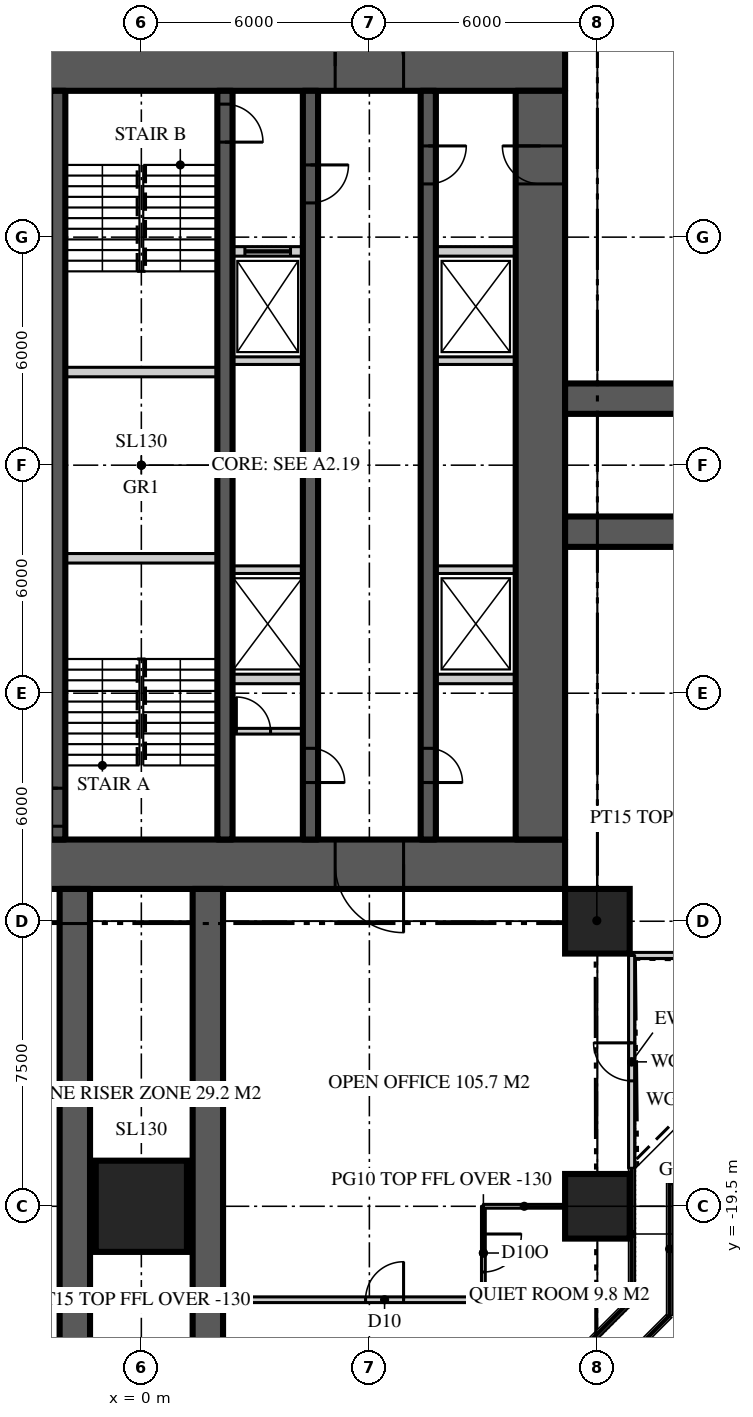
"""IFC4 building model, lengths in metres.
Left out: names, types, materials, properties, quantities, classifications, styles, units other than length and angle.
Written with IfcOpenShell. Run it as: python <this file> out.ifc"""

import sys

from ifc_helpers import new_model, si_unit, direction, frame, frame_2d, origin, origin_2d, place, context, subcontext, project, spatial, rectangle, extrude, element, fill, save


model = new_model("IFC4")
c1 = context("Model", 3, precision=1e-05, world=origin(), true_north=direction((0.0, 1.0)))
c2 = subcontext(c1, "Body", "Model", "MODEL_VIEW")
j1 = project(units=[si_unit("LENGTHUNIT", "METRE"), si_unit("PLANEANGLEUNIT", "RADIAN")], contexts=[c1])
p1 = place(None, origin())
s1 = spatial("IfcSite", under=j1, at=p1, CompositionType="ELEMENT")
p2 = place(p1, origin())
s2 = spatial("IfcBuilding", under=s1, at=p2, CompositionType="ELEMENT")
p3 = place(p2, frame((0.0, 0.0, 132.0)))
s3 = spatial("IfcBuildingStorey", under=s2, at=p3, CompositionType="ELEMENT", Elevation=132.0)
p4 = place(p3, frame((-11.15, 10.5, 0.0), z_axis=(0.0, 0.0, 1.0), x_axis=(1.0, 0.0, 0.0)))
e1 = element("IfcWall", 1, at=p4, inside=s3, PredefinedType="SHEAR", context=c2, shape_type="SweptSolid", body=[
    extrude(rectangle(XDim=22.3, YDim=1.3, at=frame_2d((11.15, 0.0))), origin(), (0.0, 0.0, 1.0), 3.9),
])
p5 = place(p4, frame((4.25, 0.0, 0.0)))
e2 = element("IfcOpeningElement", 2, at=p5, cuts=e1, PredefinedType="OPENING", context=c2, shape_type="SweptSolid", body=[
    extrude(rectangle(XDim=1.8, YDim=2.2, at=frame_2d((0.9, 1.1))), frame((0.0, 0.66, 0.0), z_axis=(0.0, -1.0, 0.0), x_axis=(1.0, 0.0, 0.0)), (0.0, 0.0, 1.0), 1.32),
])
p6 = place(p4, frame((16.25, 0.0, 0.0)))
e3 = element("IfcOpeningElement", 3, at=p6, cuts=e1, PredefinedType="OPENING", context=c2, shape_type="SweptSolid", body=[
    extrude(rectangle(XDim=1.8, YDim=2.2, at=frame_2d((0.9, 1.1))), frame((0.0, 0.66, 0.0), z_axis=(0.0, -1.0, 0.0), x_axis=(1.0, 0.0, 0.0)), (0.0, 0.0, 1.0), 1.32),
])
p7 = place(p3, frame((11.15, -10.5, 0.0), z_axis=(0.0, 0.0, 1.0), x_axis=(-1.0, 0.0, 0.0)))
e4 = element("IfcWall", 4, at=p7, inside=s3, PredefinedType="SHEAR", context=c2, shape_type="SweptSolid", body=[
    extrude(rectangle(XDim=22.3, YDim=1.3, at=frame_2d((11.15, 0.0))), origin(), (0.0, 0.0, 1.0), 3.9),
])
p8 = place(p7, frame((16.25, 0.0, 0.0)))
e5 = element("IfcOpeningElement", 5, at=p8, cuts=e4, PredefinedType="OPENING", context=c2, shape_type="SweptSolid", body=[
    extrude(rectangle(XDim=1.8, YDim=2.2, at=frame_2d((0.9, 1.1))), frame((0.0, 0.66, 0.0), z_axis=(0.0, -1.0, 0.0), x_axis=(1.0, 0.0, 0.0)), (0.0, 0.0, 1.0), 1.32),
])
p9 = place(p7, frame((4.25, 0.0, 0.0)))
e6 = element("IfcOpeningElement", 6, at=p9, cuts=e4, PredefinedType="OPENING", context=c2, shape_type="SweptSolid", body=[
    extrude(rectangle(XDim=1.8, YDim=2.2, at=frame_2d((0.9, 1.1))), frame((0.0, 0.66, 0.0), z_axis=(0.0, -1.0, 0.0), x_axis=(1.0, 0.0, 0.0)), (0.0, 0.0, 1.0), 1.32),
])
p10 = place(p3, frame((10.5, -9.85, 0.0), z_axis=(0.0, 0.0, 1.0), x_axis=(0.0, 1.0, 0.0)))
e7 = element("IfcWall", 7, at=p10, inside=s3, PredefinedType="SHEAR", context=c2, shape_type="SweptSolid", body=[
    extrude(rectangle(XDim=19.7, YDim=1.3, at=frame_2d((9.85, 0.0))), origin(), (0.0, 0.0, 1.0), 3.9),
])
p11 = place(p10, frame((17.25, 0.0, 0.0)))
e8 = element("IfcOpeningElement", 8, at=p11, cuts=e7, PredefinedType="OPENING", context=c2, shape_type="SweptSolid", body=[
    extrude(rectangle(XDim=1.0, YDim=2.2, at=frame_2d((0.5, 1.1))), frame((0.0, 0.66, 0.0), z_axis=(0.0, -1.0, 0.0), x_axis=(1.0, 0.0, 0.0)), (0.0, 0.0, 1.0), 1.32),
])
for number, where, z_axis, x_axis in (
    (9, (11.15, -1.75, 0.0), (0.0, 0.0, 1.0), (1.0, 0.0, 0.0)),
    (10, (11.15, 1.75, 0.0), (0.0, 0.0, 1.0), (1.0, 0.0, 0.0)),
    (11, (-1.75, -11.15, 0.0), (0.0, 0.0, 1.0), (0.0, -1.0, 0.0)),
    (12, (1.75, -11.15, 0.0), (0.0, 0.0, 1.0), (0.0, -1.0, 0.0)),
):
    element("IfcWall", number, at=place(p3, frame(where, z_axis=z_axis, x_axis=x_axis)), inside=s3, PredefinedType="SHEAR", context=c2, shape_type="SweptSolid", body=[
        extrude(rectangle(XDim=15.25, YDim=0.8, at=frame_2d((7.625, 0.0))), origin(), (0.0, 0.0, 1.0), 3.9),
    ])
p12 = place(p3, frame((0.0, -19.5, 0.0), z_axis=(0.0, 0.0, 1.0), x_axis=(1.0, 0.0, 0.0)))
e13 = element("IfcColumn", 13, at=p12, inside=s3, PredefinedType="COLUMN", context=c2, shape_type="SweptSolid", body=[
    extrude(rectangle(XDim=2.4, YDim=2.4, at=origin_2d()), origin(), (0.0, 0.0, 1.0), 3.9),
])
for number, where, z_axis, x_axis in (
    (14, (12.0, -19.5, 0.0), (0.0, 0.0, 1.0), (1.0, 0.0, 0.0)),
    (15, (12.0, -12.0, 0.0), (0.0, 0.0, 1.0), (1.0, 0.0, 0.0)),
):
    element("IfcColumn", number, at=place(p3, frame(where, z_axis=z_axis, x_axis=x_axis)), inside=s3, PredefinedType="COLUMN", context=c2, shape_type="SweptSolid", body=[
        extrude(rectangle(XDim=1.7, YDim=1.7, at=origin_2d()), origin(), (0.0, 0.0, 1.0), 3.9),
    ])
p13 = place(p3, frame((12.9, -12.9, 0.0), z_axis=(0.0, 0.0, 1.0), x_axis=(1.0, 0.0, 0.0)))
e16 = element("IfcWall", 16, at=p13, inside=s3, PredefinedType="SOLIDWALL", context=c2, shape_type="SweptSolid", body=[
    extrude(rectangle(XDim=5.6, YDim=0.16, at=frame_2d((2.8, 0.0))), origin(), (0.0, 0.0, 1.0), 3.77),
])
p14 = place(p3, frame((12.9, -18.5, 0.0), z_axis=(0.0, 0.0, 1.0), x_axis=(0.0, 1.0, 0.0)))
e17 = element("IfcWall", 17, at=p14, inside=s3, PredefinedType="SOLIDWALL", context=c2, shape_type="SweptSolid", body=[
    extrude(rectangle(XDim=5.6, YDim=0.16, at=frame_2d((2.8, 0.0))), origin(), (0.0, 0.0, 1.0), 3.77),
])
p15 = place(p14, frame((2.3, 0.0, 0.0)))
e18 = element("IfcOpeningElement", 18, at=p15, cuts=e17, PredefinedType="OPENING", context=c2, shape_type="SweptSolid", body=[
    extrude(rectangle(XDim=1.0, YDim=2.2, at=frame_2d((0.5, 1.1))), frame((0.0, 0.09, 0.0), z_axis=(0.0, -1.0, 0.0), x_axis=(1.0, 0.0, 0.0)), (0.0, 0.0, 1.0), 0.18),
])
p16 = place(p3, frame((7.55, 9.85, 0.0), z_axis=(0.0, 0.0, 1.0), x_axis=(0.0, -1.0, 0.0)))
e19 = element("IfcWall", 19, at=p16, inside=s3, PredefinedType="SHEAR", context=c2, shape_type="SweptSolid", body=[
    extrude(rectangle(XDim=19.7, YDim=0.4, at=frame_2d((9.85, 0.0))), origin(), (0.0, 0.0, 1.0), 3.9),
])
p17 = place(p16, frame((1.45, 0.0, 0.0)))
e20 = element("IfcOpeningElement", 20, at=p17, cuts=e19, PredefinedType="OPENING", context=c2, shape_type="SweptSolid", body=[
    extrude(rectangle(XDim=1.0, YDim=2.2, at=frame_2d((0.5, 1.1))), frame((0.0, 0.21, 0.0), z_axis=(0.0, -1.0, 0.0), x_axis=(1.0, 0.0, 0.0)), (0.0, 0.0, 1.0), 0.42),
])
p18 = place(p16, frame((17.3, 0.0, 0.0)))
e21 = element("IfcOpeningElement", 21, at=p18, cuts=e19, PredefinedType="OPENING", context=c2, shape_type="SweptSolid", body=[
    extrude(rectangle(XDim=0.9, YDim=2.1, at=frame_2d((0.45, 1.05))), frame((0.0, 0.21, 0.0), z_axis=(0.0, -1.0, 0.0), x_axis=(1.0, 0.0, 0.0)), (0.0, 0.0, 1.0), 0.42),
])
p19 = place(p3, frame((4.45, 9.85, 0.0), z_axis=(0.0, 0.0, 1.0), x_axis=(0.0, -1.0, 0.0)))
e22 = element("IfcWall", 22, at=p19, inside=s3, PredefinedType="SHEAR", context=c2, shape_type="SweptSolid", body=[
    extrude(rectangle(XDim=19.7, YDim=0.4, at=frame_2d((9.85, 0.0))), origin(), (0.0, 0.0, 1.0), 3.9),
])
p20 = place(p19, frame((1.95, 0.0, 0.0)))
e23 = element("IfcOpeningElement", 23, at=p20, cuts=e22, PredefinedType="OPENING", context=c2, shape_type="SweptSolid", body=[
    extrude(rectangle(XDim=1.0, YDim=2.2, at=frame_2d((0.5, 1.1))), frame((0.0, 0.21, 0.0), z_axis=(0.0, -1.0, 0.0), x_axis=(1.0, 0.0, 0.0)), (0.0, 0.0, 1.0), 0.42),
])
p21 = place(p19, frame((17.3, 0.0, 0.0)))
e24 = element("IfcOpeningElement", 24, at=p21, cuts=e22, PredefinedType="OPENING", context=c2, shape_type="SweptSolid", body=[
    extrude(rectangle(XDim=0.9, YDim=2.1, at=frame_2d((0.45, 1.05))), frame((0.0, 0.21, 0.0), z_axis=(0.0, -1.0, 0.0), x_axis=(1.0, 0.0, 0.0)), (0.0, 0.0, 1.0), 0.42),
])
p22 = place(p3, frame((-2.2, -9.85, 0.0), z_axis=(0.0, 0.0, 1.0), x_axis=(0.0, 1.0, 0.0)))
e25 = element("IfcWall", 25, at=p22, inside=s3, PredefinedType="SHEAR", context=c2, shape_type="SweptSolid", body=[
    extrude(rectangle(XDim=19.7, YDim=0.4, at=frame_2d((9.85, 0.0))), origin(), (0.0, 0.0, 1.0), 3.9),
])
p23 = place(p22, frame((0.35, 0.0, 0.0)))
e26 = element("IfcOpeningElement", 26, at=p23, cuts=e25, PredefinedType="OPENING", context=c2, shape_type="SweptSolid", body=[
    extrude(rectangle(XDim=1.0, YDim=2.2, at=frame_2d((0.5, 1.1))), frame((0.0, 0.21, 0.0), z_axis=(0.0, -1.0, 0.0), x_axis=(1.0, 0.0, 0.0)), (0.0, 0.0, 1.0), 0.42),
])
p24 = place(p3, frame((2.2, 9.85, 0.0), z_axis=(0.0, 0.0, 1.0), x_axis=(0.0, -1.0, 0.0)))
e27 = element("IfcWall", 27, at=p24, inside=s3, PredefinedType="SHEAR", context=c2, shape_type="SweptSolid", body=[
    extrude(rectangle(XDim=19.7, YDim=0.4, at=frame_2d((9.85, 0.0))), origin(), (0.0, 0.0, 1.0), 3.9),
])
p25 = place(p24, frame((0.35, 0.0, 0.0)))
e28 = element("IfcOpeningElement", 28, at=p25, cuts=e27, PredefinedType="OPENING", context=c2, shape_type="SweptSolid", body=[
    extrude(rectangle(XDim=1.0, YDim=2.2, at=frame_2d((0.5, 1.1))), frame((0.0, 0.21, 0.0), z_axis=(0.0, -1.0, 0.0), x_axis=(1.0, 0.0, 0.0)), (0.0, 0.0, 1.0), 0.42),
])
p26 = place(p3, frame((2.4, 5.625, 0.0), z_axis=(0.0, 0.0, 1.0), x_axis=(1.0, 0.0, 0.0)))
e29 = element("IfcWall", 29, at=p26, inside=s3, PredefinedType="SOLIDWALL", context=c2, shape_type="SweptSolid", body=[
    extrude(rectangle(XDim=1.85, YDim=0.25, at=frame_2d((0.925, 0.0))), origin(), (0.0, 0.0, 1.0), 3.7),
])
p27 = place(p26, frame((0.325, 0.0, 0.0)))
e30 = element("IfcOpeningElement", 30, at=p27, cuts=e29, PredefinedType="OPENING", context=c2, shape_type="SweptSolid", body=[
    extrude(rectangle(XDim=1.2, YDim=2.2, at=frame_2d((0.6, 1.1))), frame((0.0, 0.135, 0.0), z_axis=(0.0, -1.0, 0.0), x_axis=(1.0, 0.0, 0.0)), (0.0, 0.0, 1.0), 0.27),
])
p28 = place(p3, frame((7.75, 5.625, 0.0), z_axis=(0.0, 0.0, 1.0), x_axis=(1.0, 0.0, 0.0)))
e31 = element("IfcWall", 31, at=p28, inside=s3, PredefinedType="SOLIDWALL", context=c2, shape_type="SweptSolid", body=[
    extrude(rectangle(XDim=2.1, YDim=0.25, at=frame_2d((1.05, 0.0))), origin(), (0.0, 0.0, 1.0), 3.7),
])
p29 = place(p3, frame((2.4, -5.625, 0.0), z_axis=(0.0, 0.0, 1.0), x_axis=(1.0, 0.0, 0.0)))
e32 = element("IfcWall", 32, at=p29, inside=s3, PredefinedType="SOLIDWALL", context=c2, shape_type="SweptSolid", body=[
    extrude(rectangle(XDim=1.85, YDim=0.25, at=frame_2d((0.925, 0.0))), origin(), (0.0, 0.0, 1.0), 3.7),
])
p30 = place(p3, frame((7.75, -5.625, 0.0), z_axis=(0.0, 0.0, 1.0), x_axis=(1.0, 0.0, 0.0)))
e33 = element("IfcWall", 33, at=p30, inside=s3, PredefinedType="SOLIDWALL", context=c2, shape_type="SweptSolid", body=[
    extrude(rectangle(XDim=2.1, YDim=0.25, at=frame_2d((1.05, 0.0))), origin(), (0.0, 0.0, 1.0), 3.7),
])
for number, where, z_axis, x_axis in (
    (34, (-2.0, -2.45, 0.0), (0.0, 0.0, 1.0), (1.0, 0.0, 0.0)),
    (35, (-2.0, 2.45, 0.0), (0.0, 0.0, 1.0), (1.0, 0.0, 0.0)),
):
    element("IfcWall", number, at=place(p3, frame(where, z_axis=z_axis, x_axis=x_axis)), inside=s3, PredefinedType="SOLIDWALL", context=c2, shape_type="SweptSolid", body=[
        extrude(rectangle(XDim=4.0, YDim=0.25, at=frame_2d((2.0, 0.0))), origin(), (0.0, 0.0, 1.0), 3.7),
    ])
p31 = place(p3, frame((2.4, -2.75, 0.0), z_axis=(0.0, 0.0, 1.0), x_axis=(1.0, 0.0, 0.0)))
e36 = element("IfcWall", 36, at=p31, inside=s3, PredefinedType="SOLIDWALL", context=c2, shape_type="SweptSolid", body=[
    extrude(rectangle(XDim=1.85, YDim=0.2, at=frame_2d((0.925, 0.0))), origin(), (0.0, 0.0, 1.0), 3.7),
])
p32 = place(p3, frame((7.75, -2.75, 0.0), z_axis=(0.0, 0.0, 1.0), x_axis=(1.0, 0.0, 0.0)))
e37 = element("IfcWall", 37, at=p32, inside=s3, PredefinedType="SOLIDWALL", context=c2, shape_type="SweptSolid", body=[
    extrude(rectangle(XDim=2.1, YDim=0.2, at=frame_2d((1.05, 0.0))), origin(), (0.0, 0.0, 1.0), 3.7),
])
p33 = place(p3, frame((2.4, 2.75, 0.0), z_axis=(0.0, 0.0, 1.0), x_axis=(1.0, 0.0, 0.0)))
e38 = element("IfcWall", 38, at=p33, inside=s3, PredefinedType="SOLIDWALL", context=c2, shape_type="SweptSolid", body=[
    extrude(rectangle(XDim=1.85, YDim=0.2, at=frame_2d((0.925, 0.0))), origin(), (0.0, 0.0, 1.0), 3.7),
])
p34 = place(p3, frame((7.75, 2.75, 0.0), z_axis=(0.0, 0.0, 1.0), x_axis=(1.0, 0.0, 0.0)))
e39 = element("IfcWall", 39, at=p34, inside=s3, PredefinedType="SOLIDWALL", context=c2, shape_type="SweptSolid", body=[
    extrude(rectangle(XDim=2.1, YDim=0.2, at=frame_2d((1.05, 0.0))), origin(), (0.0, 0.0, 1.0), 3.7),
])
p35 = place(p3, frame((-12.786, -21.959, 0.0), z_axis=(0.0, 0.0, 1.0), x_axis=(1.0, 0.0, 0.0)))
e40 = element("IfcWall", 40, at=p35, inside=s3, PredefinedType="PARTITIONING", context=c2, shape_type="SweptSolid", body=[
    extrude(rectangle(XDim=25.573, YDim=0.15, at=frame_2d((12.786, 0.0))), origin(), (0.0, 0.0, 1.0), 3.77),
])
p36 = place(p35, frame((18.687, 0.0, 0.0)))
e41 = element("IfcOpeningElement", 41, at=p36, cuts=e40, PredefinedType="OPENING", context=c2, shape_type="SweptSolid", body=[
    extrude(rectangle(XDim=1.0, YDim=2.2, at=frame_2d((0.5, 1.1))), frame((0.0, 0.085, 0.0), z_axis=(0.0, -1.0, 0.0), x_axis=(1.0, 0.0, 0.0)), (0.0, 0.0, 1.0), 0.17),
])
p37 = place(p35, frame((5.886, 0.0, 0.0)))
e42 = element("IfcOpeningElement", 42, at=p37, cuts=e40, PredefinedType="OPENING", context=c2, shape_type="SweptSolid", body=[
    extrude(rectangle(XDim=1.0, YDim=2.2, at=frame_2d((0.5, 1.1))), frame((0.0, 0.085, 0.0), z_axis=(0.0, -1.0, 0.0), x_axis=(1.0, 0.0, 0.0)), (0.0, 0.0, 1.0), 0.17),
])
p38 = place(p3, frame((9.0, -19.5, 0.0), z_axis=(0.0, 0.0, 1.0), x_axis=(0.0, -1.0, 0.0)))
e43 = element("IfcWall", 43, at=p38, inside=s3, PredefinedType="PARTITIONING", context=c2, shape_type="SweptSolid", body=[
    extrude(rectangle(XDim=2.459, YDim=0.1, at=frame_2d((1.229, 0.0))), origin(), (0.0, 0.0, 1.0), 3.77),
])
p39 = place(p38, frame((0.729, 0.0, 0.0)))
e44 = element("IfcOpeningElement", 44, at=p39, cuts=e43, PredefinedType="OPENING", context=c2, shape_type="SweptSolid", body=[
    extrude(rectangle(XDim=1.0, YDim=2.2, at=frame_2d((0.5, 1.1))), frame((0.0, 0.06, 0.0), z_axis=(0.0, -1.0, 0.0), x_axis=(1.0, 0.0, 0.0)), (0.0, 0.0, 1.0), 0.12),
])
p40 = place(p3, frame((9.0, -19.5, 0.0), z_axis=(0.0, 0.0, 1.0), x_axis=(1.0, 0.0, 0.0)))
e45 = element("IfcWall", 45, at=p40, inside=s3, PredefinedType="PARTITIONING", context=c2, shape_type="SweptSolid", body=[
    extrude(rectangle(XDim=2.15, YDim=0.1, at=frame_2d((1.075, 0.0))), origin(), (0.0, 0.0, 1.0), 2.77),
])
p41 = place(p3, frame((11.15, -11.15, 0.0), z_axis=(0.0, 0.0, 1.0), x_axis=(0.707106781187, -0.707106781187, 0.0)))
e46 = element("IfcWall", 46, at=p41, inside=s3, PredefinedType="PARTITIONING", context=c2, shape_type="SweptSolid", body=[
    extrude(rectangle(XDim=2.362, YDim=0.15, at=frame_2d((1.181, 0.0))), origin(), (0.0, 0.0, 1.0), 3.22),
])
p42 = place(p3, frame((2.4, -7.0, 0.0), z_axis=(0.0, 0.0, 1.0), x_axis=(1.0, 0.0, 0.0)))
e47 = element("IfcWall", 47, at=p42, inside=s3, PredefinedType="SOLIDWALL", context=c2, shape_type="SweptSolid", body=[
    extrude(rectangle(XDim=1.85, YDim=0.15, at=frame_2d((0.925, 0.0))), origin(), (0.0, 0.0, 1.0), 3.77),
])
p43 = place(p42, frame((0.1, 0.0, 0.0)))
e48 = element("IfcOpeningElement", 48, at=p43, cuts=e47, PredefinedType="OPENING", context=c2, shape_type="SweptSolid", body=[
    extrude(rectangle(XDim=0.9, YDim=2.1, at=frame_2d((0.45, 1.05))), frame((0.0, 0.085, 0.0), z_axis=(0.0, -1.0, 0.0), x_axis=(1.0, 0.0, 0.0)), (0.0, 0.0, 1.0), 0.17),
])
p44 = place(p15, origin())
e49 = element("IfcDoor", 49, at=p44, inside=s3, OperationType="SINGLE_SWING_RIGHT", PredefinedType="DOOR", context=c2, shape_type="SweptSolid", body=[
    extrude(rectangle(XDim=1.0, YDim=2.2, at=frame_2d((0.5, 1.1))), frame((0.0, 0.025, 0.0), z_axis=(0.0, -1.0, 0.0), x_axis=(1.0, 0.0, 0.0)), (0.0, 0.0, 1.0), 0.05),
])
fill(e18, e49)
p45 = place(p6, origin())
e50 = element("IfcDoor", 50, at=p45, inside=s3, OperationType="DOUBLE_DOOR_DOUBLE_SWING", PredefinedType="DOOR", context=c2, shape_type="SweptSolid", body=[
    extrude(rectangle(XDim=1.8, YDim=2.2, at=frame_2d((0.9, 1.1))), frame((0.0, 0.025, 0.0), z_axis=(0.0, -1.0, 0.0), x_axis=(1.0, 0.0, 0.0)), (0.0, 0.0, 1.0), 0.05),
])
fill(e3, e50)
p46 = place(p9, origin())
e51 = element("IfcDoor", 51, at=p46, inside=s3, OperationType="DOUBLE_DOOR_DOUBLE_SWING", PredefinedType="DOOR", context=c2, shape_type="SweptSolid", body=[
    extrude(rectangle(XDim=1.8, YDim=2.2, at=frame_2d((0.9, 1.1))), frame((0.0, 0.025, 0.0), z_axis=(0.0, -1.0, 0.0), x_axis=(1.0, 0.0, 0.0)), (0.0, 0.0, 1.0), 0.05),
])
fill(e6, e51)
p47 = place(p17, origin())
e52 = element("IfcDoor", 52, at=p47, inside=s3, OperationType="SINGLE_SWING_LEFT", PredefinedType="DOOR", context=c2, shape_type="SweptSolid", body=[
    extrude(rectangle(XDim=1.0, YDim=2.2, at=frame_2d((0.5, 1.1))), frame((0.0, 0.025, 0.0), z_axis=(0.0, -1.0, 0.0), x_axis=(1.0, 0.0, 0.0)), (0.0, 0.0, 1.0), 0.05),
])
fill(e20, e52)
p48 = place(p11, origin())
e53 = element("IfcDoor", 53, at=p48, inside=s3, OperationType="SINGLE_SWING_RIGHT", PredefinedType="DOOR", context=c2, shape_type="SweptSolid", body=[
    extrude(rectangle(XDim=1.0, YDim=2.2, at=frame_2d((0.5, 1.1))), frame((0.0, 0.025, 0.0), z_axis=(0.0, -1.0, 0.0), x_axis=(1.0, 0.0, 0.0)), (0.0, 0.0, 1.0), 0.05),
])
fill(e8, e53)
p49 = place(p23, origin())
e54 = element("IfcDoor", 54, at=p49, inside=s3, OperationType="SINGLE_SWING_RIGHT", PredefinedType="DOOR", context=c2, shape_type="SweptSolid", body=[
    extrude(rectangle(XDim=1.0, YDim=2.2, at=frame_2d((0.5, 1.1))), frame((0.0, 0.025, 0.0), z_axis=(0.0, -1.0, 0.0), x_axis=(1.0, 0.0, 0.0)), (0.0, 0.0, 1.0), 0.05),
])
fill(e26, e54)
p50 = place(p20, origin())
e55 = element("IfcDoor", 55, at=p50, inside=s3, OperationType="SINGLE_SWING_LEFT", PredefinedType="DOOR", context=c2, shape_type="SweptSolid", body=[
    extrude(rectangle(XDim=1.0, YDim=2.2, at=frame_2d((0.5, 1.1))), frame((0.0, 0.025, 0.0), z_axis=(0.0, -1.0, 0.0), x_axis=(1.0, 0.0, 0.0)), (0.0, 0.0, 1.0), 0.05),
])
fill(e23, e55)
p51 = place(p25, origin())
e56 = element("IfcDoor", 56, at=p51, inside=s3, OperationType="SINGLE_SWING_RIGHT", PredefinedType="DOOR", context=c2, shape_type="SweptSolid", body=[
    extrude(rectangle(XDim=1.0, YDim=2.2, at=frame_2d((0.5, 1.1))), frame((0.0, 0.025, 0.0), z_axis=(0.0, -1.0, 0.0), x_axis=(1.0, 0.0, 0.0)), (0.0, 0.0, 1.0), 0.05),
])
fill(e28, e56)
p52 = place(p18, origin())
e57 = element("IfcDoor", 57, at=p52, inside=s3, OperationType="SINGLE_SWING_RIGHT", PredefinedType="DOOR", context=c2, shape_type="SweptSolid", body=[
    extrude(rectangle(XDim=0.9, YDim=2.1, at=frame_2d((0.45, 1.05))), frame((0.0, 0.025, 0.0), z_axis=(0.0, -1.0, 0.0), x_axis=(1.0, 0.0, 0.0)), (0.0, 0.0, 1.0), 0.05),
])
fill(e21, e57)
p53 = place(p21, origin())
e58 = element("IfcDoor", 58, at=p53, inside=s3, OperationType="SINGLE_SWING_RIGHT", PredefinedType="DOOR", context=c2, shape_type="SweptSolid", body=[
    extrude(rectangle(XDim=0.9, YDim=2.1, at=frame_2d((0.45, 1.05))), frame((0.0, 0.025, 0.0), z_axis=(0.0, -1.0, 0.0), x_axis=(1.0, 0.0, 0.0)), (0.0, 0.0, 1.0), 0.05),
])
fill(e24, e58)
p54 = place(p27, origin())
e59 = element("IfcDoor", 59, at=p54, inside=s3, OperationType="SLIDING_TO_LEFT", PredefinedType="DOOR", context=c2, shape_type="SweptSolid", body=[
    extrude(rectangle(XDim=1.2, YDim=2.2, at=frame_2d((0.6, 1.1))), frame((0.0, 0.025, 0.0), z_axis=(0.0, -1.0, 0.0), x_axis=(1.0, 0.0, 0.0)), (0.0, 0.0, 1.0), 0.05),
])
fill(e30, e59)
p55 = place(p36, origin())
e60 = element("IfcDoor", 60, at=p55, inside=s3, OperationType="SINGLE_SWING_RIGHT", PredefinedType="DOOR", context=c2, shape_type="SweptSolid", body=[
    extrude(rectangle(XDim=1.0, YDim=2.2, at=frame_2d((0.5, 1.1))), frame((0.0, 0.025, 0.0), z_axis=(0.0, -1.0, 0.0), x_axis=(1.0, 0.0, 0.0)), (0.0, 0.0, 1.0), 0.05),
])
fill(e41, e60)
p56 = place(p39, origin())
e61 = element("IfcDoor", 61, at=p56, inside=s3, OperationType="SINGLE_SWING_LEFT", PredefinedType="DOOR", context=c2, shape_type="SweptSolid", body=[
    extrude(rectangle(XDim=1.0, YDim=2.2, at=frame_2d((0.5, 1.1))), frame((0.0, 0.025, 0.0), z_axis=(0.0, -1.0, 0.0), x_axis=(1.0, 0.0, 0.0)), (0.0, 0.0, 1.0), 0.05),
])
fill(e44, e61)
p57 = place(p43, origin())
e62 = element("IfcDoor", 62, at=p57, inside=s3, OperationType="SINGLE_SWING_LEFT", PredefinedType="DOOR", context=c2, shape_type="SweptSolid", body=[
    extrude(rectangle(XDim=0.9, YDim=2.1, at=frame_2d((0.45, 1.05))), frame((0.0, 0.025, 0.0), z_axis=(0.0, -1.0, 0.0), x_axis=(1.0, 0.0, 0.0)), (0.0, 0.0, 1.0), 0.05),
])
fill(e48, e62)
save(model, sys.argv[1])
